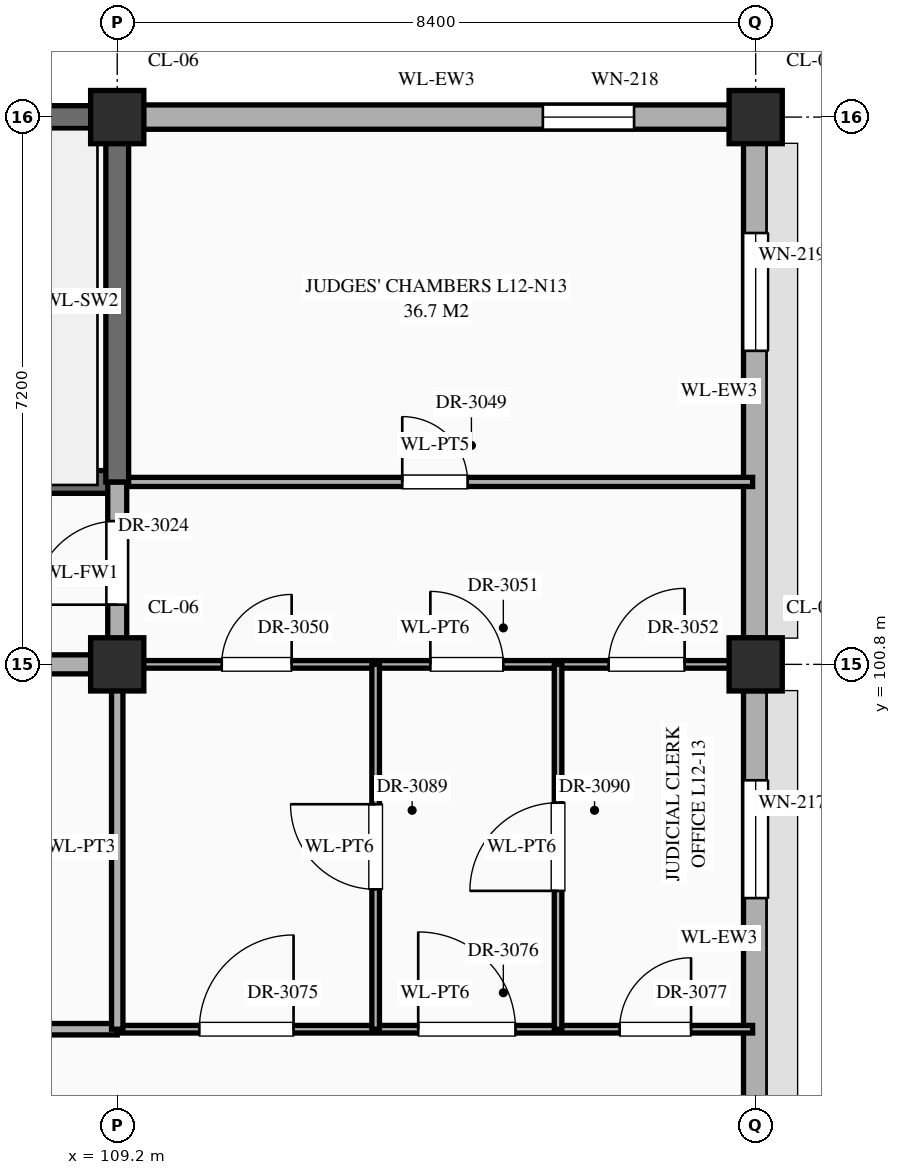
"""IFC4 building model, lengths in metres.
Left out: names, types, materials, properties, quantities, classifications, styles, units other than length and angle.
Written with IfcOpenShell. Run it as: python <this file> out.ifc"""

import sys

from ifc_helpers import new_model, si_unit, direction, frame, frame_2d, origin, origin_2d, place, context, subcontext, project, spatial, rectangle, extrude, element, fill, save


model = new_model("IFC4")
c1 = context("Model", 3, precision=1e-05, world=origin(), true_north=direction((0.0, 1.0)))
c2 = subcontext(c1, "Body", "Model", "MODEL_VIEW")
j1 = project(units=[si_unit("LENGTHUNIT", "METRE"), si_unit("PLANEANGLEUNIT", "RADIAN")], contexts=[c1])
p1 = place(None, origin())
s1 = spatial("IfcSite", under=j1, at=p1, CompositionType="ELEMENT")
p2 = place(p1, origin())
s2 = spatial("IfcBuilding", under=s1, at=p2, CompositionType="ELEMENT")
p3 = place(p2, frame((0.0, 0.0, 51.9)))
s3 = spatial("IfcBuildingStorey", under=s2, at=p3, CompositionType="ELEMENT", Elevation=51.9)
for number, where, z_axis, x_axis in (
    (1, (109.2, 100.8, 0.0), (0.0, 0.0, 1.0), (1.0, 0.0, 0.0)),
    (2, (109.2, 108.0, 0.0), (0.0, 0.0, 1.0), (1.0, 0.0, 0.0)),
    (3, (117.6, 100.8, 0.0), (0.0, 0.0, 1.0), (1.0, 0.0, 0.0)),
    (4, (117.6, 108.0, 0.0), (0.0, 0.0, 1.0), (1.0, 0.0, 0.0)),
):
    element("IfcColumn", number, at=place(p3, frame(where, z_axis=z_axis, x_axis=x_axis)), inside=s3, PredefinedType="COLUMN", context=c2, shape_type="SweptSolid", body=[
        extrude(rectangle(XDim=0.7, YDim=0.7, at=origin_2d()), origin(), (0.0, 0.0, 1.0), 4.2),
    ])
p4 = place(p3, frame((101.145, 108.0, 0.0), z_axis=(0.0, 0.0, 1.0), x_axis=(1.0, 0.0, 0.0)))
e5 = element("IfcWall", 5, at=p4, inside=s3, PredefinedType="SHEAR", context=c2, shape_type="SweptSolid", body=[
    extrude(rectangle(XDim=7.71, YDim=0.3, at=frame_2d((3.855, 0.0))), origin(), (0.0, 0.0, 1.0), 3.96),
])
p5 = place(p3, frame((117.6, 93.945, 0.0), z_axis=(0.0, 0.0, 1.0), x_axis=(0.0, 1.0, 0.0)))
e6 = element("IfcWall", 6, at=p5, inside=s3, PredefinedType="STANDARD", context=c2, shape_type="SweptSolid", body=[
    extrude(rectangle(XDim=6.51, YDim=0.32, at=frame_2d((3.255, 0.0))), origin(), (0.0, 0.0, 1.0), 3.31),
])
p6 = place(p5, frame((3.78, 0.0, 0.55)))
e7 = element("IfcOpeningElement", 7, at=p6, cuts=e6, PredefinedType="OPENING", context=c2, shape_type="SweptSolid", body=[
    extrude(rectangle(XDim=1.55, YDim=1.74, at=frame_2d((0.775, 0.87))), frame((0.0, 0.172, 0.0), z_axis=(0.0, -1.0, 0.0), x_axis=(1.0, 0.0, 0.0)), (0.0, 0.0, 1.0), 0.344),
])
p7 = place(p3, frame((109.545, 108.0, 0.0), z_axis=(0.0, 0.0, 1.0), x_axis=(1.0, 0.0, 0.0)))
e8 = element("IfcWall", 8, at=p7, inside=s3, PredefinedType="STANDARD", context=c2, shape_type="SweptSolid", body=[
    extrude(rectangle(XDim=7.71, YDim=0.32, at=frame_2d((3.855, 0.0))), origin(), (0.0, 0.0, 1.0), 3.31),
])
p8 = place(p7, frame((5.255, 0.0, 0.55)))
e9 = element("IfcOpeningElement", 9, at=p8, cuts=e8, PredefinedType="OPENING", context=c2, shape_type="SweptSolid", body=[
    extrude(rectangle(XDim=1.2, YDim=1.38, at=frame_2d((0.6, 0.69))), frame((0.0, 0.172, 0.0), z_axis=(0.0, -1.0, 0.0), x_axis=(1.0, 0.0, 0.0)), (0.0, 0.0, 1.0), 0.344),
])
p9 = place(p3, frame((117.6, 101.145, 0.0), z_axis=(0.0, 0.0, 1.0), x_axis=(0.0, 1.0, 0.0)))
e10 = element("IfcWall", 10, at=p9, inside=s3, PredefinedType="STANDARD", context=c2, shape_type="SweptSolid", body=[
    extrude(rectangle(XDim=6.51, YDim=0.32, at=frame_2d((3.255, 0.0))), origin(), (0.0, 0.0, 1.0), 3.31),
])
p10 = place(p9, frame((3.78, 0.0, 0.55)))
e11 = element("IfcOpeningElement", 11, at=p10, cuts=e10, PredefinedType="OPENING", context=c2, shape_type="SweptSolid", body=[
    extrude(rectangle(XDim=1.55, YDim=1.92, at=frame_2d((0.775, 0.96))), frame((0.0, 0.172, 0.0), z_axis=(0.0, -1.0, 0.0), x_axis=(1.0, 0.0, 0.0)), (0.0, 0.0, 1.0), 0.344),
])
p11 = place(p3, frame((92.4, 96.0, 0.0), z_axis=(0.0, 0.0, 1.0), x_axis=(1.0, 0.0, 0.0)))
e12 = element("IfcWall", 12, at=p11, inside=s3, PredefinedType="STANDARD", context=c2, shape_type="SweptSolid", body=[
    extrude(rectangle(XDim=16.8, YDim=0.15, at=frame_2d((8.4, 0.0))), origin(), (0.0, 0.0, 1.0), 3.96),
])
p12 = place(p11, frame((3.62, 0.0, 0.0)))
e13 = element("IfcOpeningElement", 13, at=p12, cuts=e12, PredefinedType="OPENING", context=c2, shape_type="SweptSolid", body=[
    extrude(rectangle(XDim=1.16, YDim=2.3, at=frame_2d((0.58, 1.15))), frame((0.0, 0.087, 0.0), z_axis=(0.0, -1.0, 0.0), x_axis=(1.0, 0.0, 0.0)), (0.0, 0.0, 1.0), 0.174),
])
p13 = place(p11, frame((12.0, 0.0, 0.0)))
e14 = element("IfcOpeningElement", 14, at=p13, cuts=e12, PredefinedType="OPENING", context=c2, shape_type="SweptSolid", body=[
    extrude(rectangle(XDim=1.2, YDim=2.35, at=frame_2d((0.6, 1.175))), frame((0.0, 0.087, 0.0), z_axis=(0.0, -1.0, 0.0), x_axis=(1.0, 0.0, 0.0)), (0.0, 0.0, 1.0), 0.174),
])
p14 = place(p3, frame((109.2, 96.0, 0.0), z_axis=(0.0, 0.0, 1.0), x_axis=(1.0, 0.0, 0.0)))
e15 = element("IfcWall", 15, at=p14, inside=s3, PredefinedType="STANDARD", context=c2, shape_type="SweptSolid", body=[
    extrude(rectangle(XDim=8.36, YDim=0.1, at=frame_2d((4.18, 0.0))), origin(), (0.0, 0.0, 1.0), 3.96),
])
p15 = place(p14, frame((1.08, 0.0, 0.0)))
e16 = element("IfcOpeningElement", 16, at=p15, cuts=e15, PredefinedType="OPENING", context=c2, shape_type="SweptSolid", body=[
    extrude(rectangle(XDim=1.24, YDim=2.3, at=frame_2d((0.62, 1.15))), frame((0.0, 0.062, 0.0), z_axis=(0.0, -1.0, 0.0), x_axis=(1.0, 0.0, 0.0)), (0.0, 0.0, 1.0), 0.124),
])
p16 = place(p14, frame((3.96, 0.0, 0.0)))
e17 = element("IfcOpeningElement", 17, at=p16, cuts=e15, PredefinedType="OPENING", context=c2, shape_type="SweptSolid", body=[
    extrude(rectangle(XDim=1.28, YDim=2.35, at=frame_2d((0.64, 1.175))), frame((0.0, 0.062, 0.0), z_axis=(0.0, -1.0, 0.0), x_axis=(1.0, 0.0, 0.0)), (0.0, 0.0, 1.0), 0.124),
])
p17 = place(p14, frame((6.61, 0.0, 0.0)))
e18 = element("IfcOpeningElement", 18, at=p17, cuts=e15, PredefinedType="OPENING", context=c2, shape_type="SweptSolid", body=[
    extrude(rectangle(XDim=0.94, YDim=2.3, at=frame_2d((0.47, 1.15))), frame((0.0, 0.062, 0.0), z_axis=(0.0, -1.0, 0.0), x_axis=(1.0, 0.0, 0.0)), (0.0, 0.0, 1.0), 0.124),
])
p18 = place(p3, frame((96.6, 100.8, 0.0), z_axis=(0.0, 0.0, 1.0), x_axis=(1.0, 0.0, 0.0)))
e19 = element("IfcWall", 19, at=p18, inside=s3, PredefinedType="STANDARD", context=c2, shape_type="SweptSolid", body=[
    extrude(rectangle(XDim=12.6, YDim=0.25, at=frame_2d((6.3, 0.0))), origin(), (0.0, 0.0, 1.0), 3.11),
])
p19 = place(p18, frame((7.9, 0.0, 0.0)))
e20 = element("IfcOpeningElement", 20, at=p19, cuts=e19, PredefinedType="OPENING", context=c2, shape_type="SweptSolid", body=[
    extrude(rectangle(XDim=1.0, YDim=2.2, at=frame_2d((0.5, 1.1))), frame((0.0, 0.137, 0.0), z_axis=(0.0, -1.0, 0.0), x_axis=(1.0, 0.0, 0.0)), (0.0, 0.0, 1.0), 0.274),
])
p20 = place(p3, frame((109.2, 100.8, 0.0), z_axis=(0.0, 0.0, 1.0), x_axis=(1.0, 0.0, 0.0)))
e21 = element("IfcWall", 21, at=p20, inside=s3, PredefinedType="STANDARD", context=c2, shape_type="SweptSolid", body=[
    extrude(rectangle(XDim=8.36, YDim=0.1, at=frame_2d((4.18, 0.0))), origin(), (0.0, 0.0, 1.0), 3.11),
])
p21 = place(p20, frame((1.375, 0.0, 0.0)))
e22 = element("IfcOpeningElement", 22, at=p21, cuts=e21, PredefinedType="OPENING", context=c2, shape_type="SweptSolid", body=[
    extrude(rectangle(XDim=0.92, YDim=2.15, at=frame_2d((0.46, 1.075))), frame((0.0, 0.062, 0.0), z_axis=(0.0, -1.0, 0.0), x_axis=(1.0, 0.0, 0.0)), (0.0, 0.0, 1.0), 0.124),
])
p22 = place(p20, frame((4.12, 0.0, 0.0)))
e23 = element("IfcOpeningElement", 23, at=p22, cuts=e21, PredefinedType="OPENING", context=c2, shape_type="SweptSolid", body=[
    extrude(rectangle(XDim=0.96, YDim=2.2, at=frame_2d((0.48, 1.1))), frame((0.0, 0.062, 0.0), z_axis=(0.0, -1.0, 0.0), x_axis=(1.0, 0.0, 0.0)), (0.0, 0.0, 1.0), 0.124),
])
p23 = place(p20, frame((6.465, 0.0, 0.0)))
e24 = element("IfcOpeningElement", 24, at=p23, cuts=e21, PredefinedType="OPENING", context=c2, shape_type="SweptSolid", body=[
    extrude(rectangle(XDim=1.0, YDim=2.25, at=frame_2d((0.5, 1.125))), frame((0.0, 0.062, 0.0), z_axis=(0.0, -1.0, 0.0), x_axis=(1.0, 0.0, 0.0)), (0.0, 0.0, 1.0), 0.124),
])
p24 = place(p3, frame((100.8, 103.2, 0.0), z_axis=(0.0, 0.0, 1.0), x_axis=(1.0, 0.0, 0.0)))
e25 = element("IfcWall", 25, at=p24, inside=s3, PredefinedType="SHEAR", context=c2, shape_type="SweptSolid", body=[
    extrude(rectangle(XDim=8.4, YDim=0.3, at=frame_2d((4.2, 0.0))), origin(), (0.0, 0.0, 1.0), 3.96),
])
p25 = place(p24, frame((0.65, 0.0, 0.0)))
e26 = element("IfcOpeningElement", 26, at=p25, cuts=e25, PredefinedType="OPENING", context=c2, shape_type="SweptSolid", body=[
    extrude(rectangle(XDim=1.1, YDim=2.2, at=frame_2d((0.55, 1.1))), frame((0.0, 0.162, 0.0), z_axis=(0.0, -1.0, 0.0), x_axis=(1.0, 0.0, 0.0)), (0.0, 0.0, 1.0), 0.324),
])
p26 = place(p3, frame((109.2, 103.2, 0.0), z_axis=(0.0, 0.0, 1.0), x_axis=(1.0, 0.0, 0.0)))
e27 = element("IfcWall", 27, at=p26, inside=s3, PredefinedType="STANDARD", context=c2, shape_type="SweptSolid", body=[
    extrude(rectangle(XDim=8.36, YDim=0.12, at=frame_2d((4.18, 0.0))), origin(), (0.0, 0.0, 1.0), 3.96),
])
p27 = place(p26, frame((3.75, 0.0, 0.0)))
e28 = element("IfcOpeningElement", 28, at=p27, cuts=e27, PredefinedType="OPENING", context=c2, shape_type="SweptSolid", body=[
    extrude(rectangle(XDim=0.86, YDim=2.1, at=frame_2d((0.43, 1.05))), frame((0.0, 0.072, 0.0), z_axis=(0.0, -1.0, 0.0), x_axis=(1.0, 0.0, 0.0)), (0.0, 0.0, 1.0), 0.144),
])
p28 = place(p3, frame((109.2, 96.0, 0.0), z_axis=(0.0, 0.0, 1.0), x_axis=(0.0, 1.0, 0.0)))
e29 = element("IfcWall", 29, at=p28, inside=s3, PredefinedType="STANDARD", context=c2, shape_type="SweptSolid", body=[
    extrude(rectangle(XDim=4.8, YDim=0.15, at=frame_2d((2.4, 0.0))), origin(), (0.0, 0.0, 1.0), 3.21),
])
p29 = place(p3, frame((109.2, 100.8, 0.0), z_axis=(0.0, 0.0, 1.0), x_axis=(0.0, 1.0, 0.0)))
e30 = element("IfcWall", 30, at=p29, inside=s3, PredefinedType="STANDARD", context=c2, shape_type="SweptSolid", body=[
    extrude(rectangle(XDim=2.4, YDim=0.25, at=frame_2d((1.2, 0.0))), origin(), (0.0, 0.0, 1.0), 3.21),
])
p30 = place(p29, frame((0.785, 0.0, 0.0)))
e31 = element("IfcOpeningElement", 31, at=p30, cuts=e30, PredefinedType="OPENING", context=c2, shape_type="SweptSolid", body=[
    extrude(rectangle(XDim=1.1, YDim=2.2, at=frame_2d((0.55, 1.1))), frame((0.0, 0.137, 0.0), z_axis=(0.0, -1.0, 0.0), x_axis=(1.0, 0.0, 0.0)), (0.0, 0.0, 1.0), 0.274),
])
p31 = place(p3, frame((109.2, 103.2, 0.0), z_axis=(0.0, 0.0, 1.0), x_axis=(0.0, 1.0, 0.0)))
e32 = element("IfcWall", 32, at=p31, inside=s3, PredefinedType="SHEAR", context=c2, shape_type="SweptSolid", body=[
    extrude(rectangle(XDim=4.76, YDim=0.3, at=frame_2d((2.38, 0.0))), origin(), (0.0, 0.0, 1.0), 3.96),
])
p32 = place(p3, frame((112.6, 96.0, 0.0), z_axis=(0.0, 0.0, 1.0), x_axis=(0.0, 1.0, 0.0)))
e33 = element("IfcWall", 33, at=p32, inside=s3, PredefinedType="STANDARD", context=c2, shape_type="SweptSolid", body=[
    extrude(rectangle(XDim=4.8, YDim=0.1, at=frame_2d((2.4, 0.0))), origin(), (0.0, 0.0, 1.0), 3.96),
])
p33 = place(p32, frame((1.84, 0.0, 0.0)))
e34 = element("IfcOpeningElement", 34, at=p33, cuts=e33, PredefinedType="OPENING", context=c2, shape_type="SweptSolid", body=[
    extrude(rectangle(XDim=1.12, YDim=2.25, at=frame_2d((0.56, 1.125))), frame((0.0, 0.062, 0.0), z_axis=(0.0, -1.0, 0.0), x_axis=(1.0, 0.0, 0.0)), (0.0, 0.0, 1.0), 0.124),
])
p34 = place(p3, frame((115.0, 96.0, 0.0), z_axis=(0.0, 0.0, 1.0), x_axis=(0.0, 1.0, 0.0)))
e35 = element("IfcWall", 35, at=p34, inside=s3, PredefinedType="STANDARD", context=c2, shape_type="SweptSolid", body=[
    extrude(rectangle(XDim=4.8, YDim=0.1, at=frame_2d((2.4, 0.0))), origin(), (0.0, 0.0, 1.0), 3.96),
])
p35 = place(p34, frame((1.82, 0.0, 0.0)))
e36 = element("IfcOpeningElement", 36, at=p35, cuts=e35, PredefinedType="OPENING", context=c2, shape_type="SweptSolid", body=[
    extrude(rectangle(XDim=1.16, YDim=2.3, at=frame_2d((0.58, 1.15))), frame((0.0, 0.062, 0.0), z_axis=(0.0, -1.0, 0.0), x_axis=(1.0, 0.0, 0.0)), (0.0, 0.0, 1.0), 0.124),
])
p36 = place(p6, origin())
e37 = element("IfcWindow", 37, at=p36, inside=s3, PartitioningType="SINGLE_PANEL", PredefinedType="WINDOW", context=c2, shape_type="SweptSolid", body=[
    extrude(rectangle(XDim=1.55, YDim=1.74, at=frame_2d((0.775, 0.87))), frame((0.0, 0.03, 0.0), z_axis=(0.0, -1.0, 0.0), x_axis=(1.0, 0.0, 0.0)), (0.0, 0.0, 1.0), 0.06),
])
fill(e7, e37)
p37 = place(p8, origin())
e38 = element("IfcWindow", 38, at=p37, inside=s3, PartitioningType="SINGLE_PANEL", PredefinedType="WINDOW", context=c2, shape_type="SweptSolid", body=[
    extrude(rectangle(XDim=1.2, YDim=1.38, at=frame_2d((0.6, 0.69))), frame((0.0, 0.03, 0.0), z_axis=(0.0, -1.0, 0.0), x_axis=(1.0, 0.0, 0.0)), (0.0, 0.0, 1.0), 0.06),
])
fill(e9, e38)
p38 = place(p10, origin())
e39 = element("IfcWindow", 39, at=p38, inside=s3, PartitioningType="SINGLE_PANEL", PredefinedType="WINDOW", context=c2, shape_type="SweptSolid", body=[
    extrude(rectangle(XDim=1.55, YDim=1.92, at=frame_2d((0.775, 0.96))), frame((0.0, 0.03, 0.0), z_axis=(0.0, -1.0, 0.0), x_axis=(1.0, 0.0, 0.0)), (0.0, 0.0, 1.0), 0.06),
])
fill(e11, e39)
p39 = place(p30, origin())
e40 = element("IfcDoor", 40, at=p39, inside=s3, OperationType="SINGLE_SWING_LEFT", PredefinedType="DOOR", context=c2, shape_type="SweptSolid", body=[
    extrude(rectangle(XDim=1.1, YDim=2.2, at=frame_2d((0.55, 1.1))), frame((0.0, 0.025, 0.0), z_axis=(0.0, -1.0, 0.0), x_axis=(1.0, 0.0, 0.0)), (0.0, 0.0, 1.0), 0.05),
])
fill(e31, e40)
p40 = place(p27, origin())
e41 = element("IfcDoor", 41, at=p40, inside=s3, OperationType="SINGLE_SWING_LEFT", PredefinedType="DOOR", context=c2, shape_type="SweptSolid", body=[
    extrude(rectangle(XDim=0.86, YDim=2.1, at=frame_2d((0.43, 1.05))), frame((0.0, 0.025, 0.0), z_axis=(0.0, -1.0, 0.0), x_axis=(1.0, 0.0, 0.0)), (0.0, 0.0, 1.0), 0.05),
])
fill(e28, e41)
p41 = place(p21, origin())
e42 = element("IfcDoor", 42, at=p41, inside=s3, OperationType="SINGLE_SWING_RIGHT", PredefinedType="DOOR", context=c2, shape_type="SweptSolid", body=[
    extrude(rectangle(XDim=0.92, YDim=2.15, at=frame_2d((0.46, 1.075))), frame((0.0, 0.025, 0.0), z_axis=(0.0, -1.0, 0.0), x_axis=(1.0, 0.0, 0.0)), (0.0, 0.0, 1.0), 0.05),
])
fill(e22, e42)
p42 = place(p22, origin())
e43 = element("IfcDoor", 43, at=p42, inside=s3, OperationType="SINGLE_SWING_LEFT", PredefinedType="DOOR", context=c2, shape_type="SweptSolid", body=[
    extrude(rectangle(XDim=0.96, YDim=2.2, at=frame_2d((0.48, 1.1))), frame((0.0, 0.025, 0.0), z_axis=(0.0, -1.0, 0.0), x_axis=(1.0, 0.0, 0.0)), (0.0, 0.0, 1.0), 0.05),
])
fill(e23, e43)
p43 = place(p23, origin())
e44 = element("IfcDoor", 44, at=p43, inside=s3, OperationType="SINGLE_SWING_RIGHT", PredefinedType="DOOR", context=c2, shape_type="SweptSolid", body=[
    extrude(rectangle(XDim=1.0, YDim=2.25, at=frame_2d((0.5, 1.125))), frame((0.0, 0.025, 0.0), z_axis=(0.0, -1.0, 0.0), x_axis=(1.0, 0.0, 0.0)), (0.0, 0.0, 1.0), 0.05),
])
fill(e24, e44)
p44 = place(p15, origin())
e45 = element("IfcDoor", 45, at=p44, inside=s3, OperationType="SINGLE_SWING_RIGHT", PredefinedType="DOOR", context=c2, shape_type="SweptSolid", body=[
    extrude(rectangle(XDim=1.24, YDim=2.3, at=frame_2d((0.62, 1.15))), frame((0.0, 0.025, 0.0), z_axis=(0.0, -1.0, 0.0), x_axis=(1.0, 0.0, 0.0)), (0.0, 0.0, 1.0), 0.05),
])
fill(e16, e45)
p45 = place(p16, origin())
e46 = element("IfcDoor", 46, at=p45, inside=s3, OperationType="SINGLE_SWING_LEFT", PredefinedType="DOOR", context=c2, shape_type="SweptSolid", body=[
    extrude(rectangle(XDim=1.28, YDim=2.35, at=frame_2d((0.64, 1.175))), frame((0.0, 0.025, 0.0), z_axis=(0.0, -1.0, 0.0), x_axis=(1.0, 0.0, 0.0)), (0.0, 0.0, 1.0), 0.05),
])
fill(e17, e46)
p46 = place(p17, origin())
e47 = element("IfcDoor", 47, at=p46, inside=s3, OperationType="SINGLE_SWING_RIGHT", PredefinedType="DOOR", context=c2, shape_type="SweptSolid", body=[
    extrude(rectangle(XDim=0.94, YDim=2.3, at=frame_2d((0.47, 1.15))), frame((0.0, 0.025, 0.0), z_axis=(0.0, -1.0, 0.0), x_axis=(1.0, 0.0, 0.0)), (0.0, 0.0, 1.0), 0.05),
])
fill(e18, e47)
p47 = place(p33, origin())
e48 = element("IfcDoor", 48, at=p47, inside=s3, OperationType="SINGLE_SWING_RIGHT", PredefinedType="DOOR", context=c2, shape_type="SweptSolid", body=[
    extrude(rectangle(XDim=1.12, YDim=2.25, at=frame_2d((0.56, 1.125))), frame((0.0, 0.025, 0.0), z_axis=(0.0, -1.0, 0.0), x_axis=(1.0, 0.0, 0.0)), (0.0, 0.0, 1.0), 0.05),
])
fill(e34, e48)
p48 = place(p35, origin())
e49 = element("IfcDoor", 49, at=p48, inside=s3, OperationType="SINGLE_SWING_LEFT", PredefinedType="DOOR", context=c2, shape_type="SweptSolid", body=[
    extrude(rectangle(XDim=1.16, YDim=2.3, at=frame_2d((0.58, 1.15))), frame((0.0, 0.025, 0.0), z_axis=(0.0, -1.0, 0.0), x_axis=(1.0, 0.0, 0.0)), (0.0, 0.0, 1.0), 0.05),
])
fill(e36, e49)
save(model, sys.argv[1])
